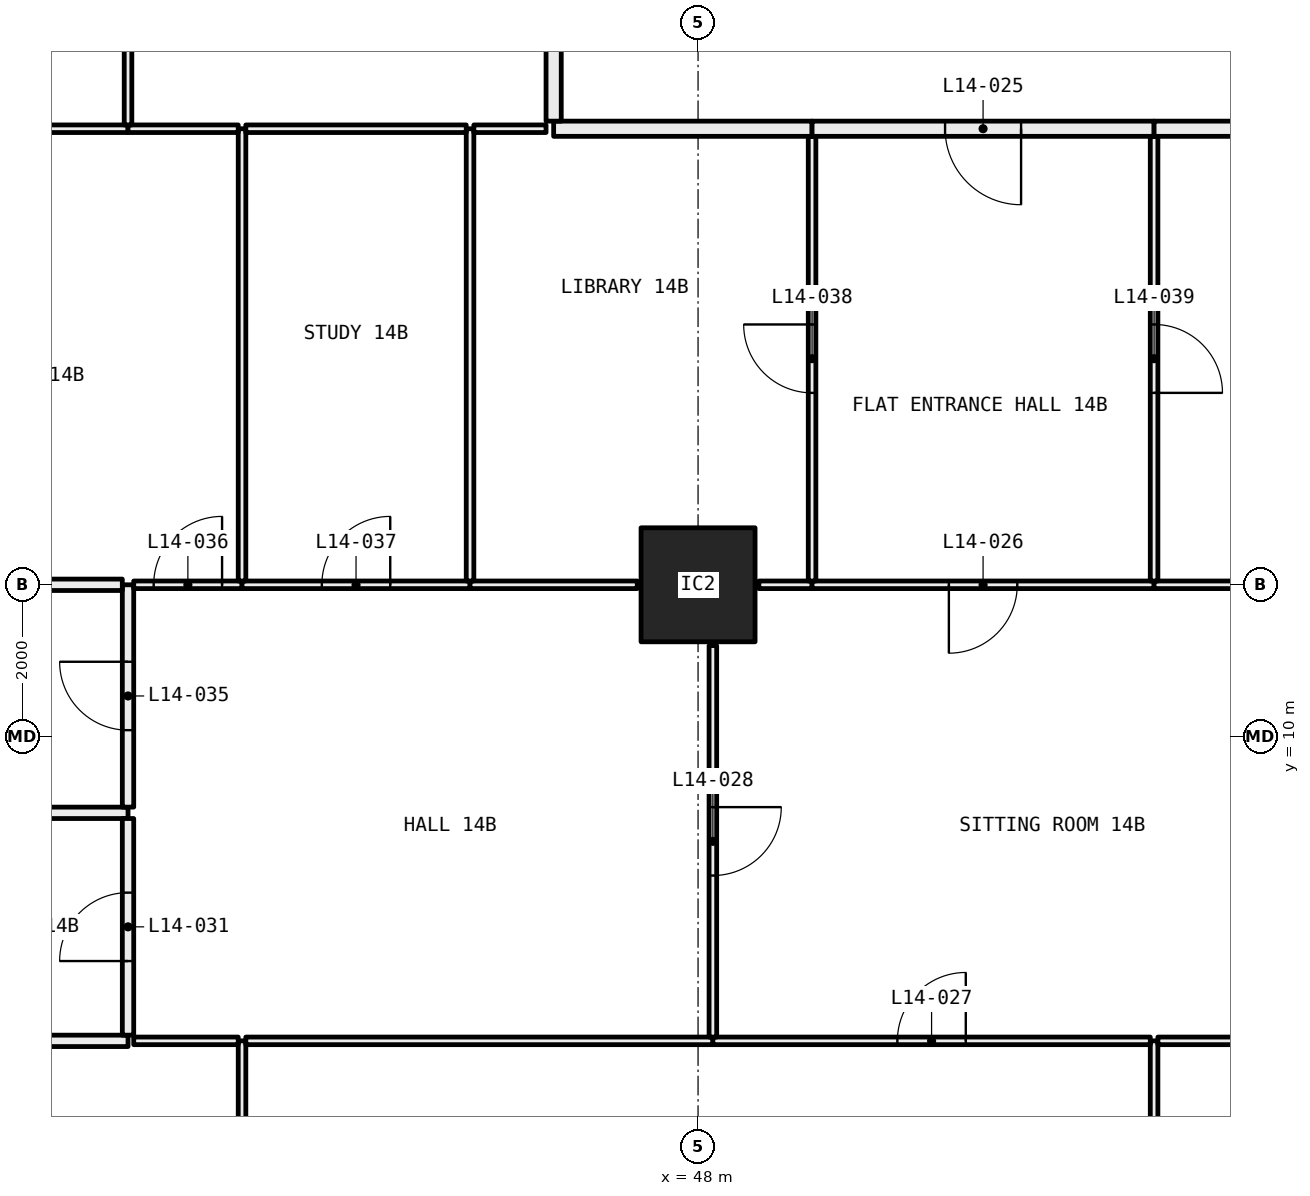
"""IFC4 building model, lengths in metres.
Left out: names, types, materials, properties, quantities, classifications, styles, units other than length and angle.
Written with IfcOpenShell. Run it as: python <this file> out.ifc"""

import sys

from ifc_helpers import new_model, si_unit, direction, frame, frame_2d, origin, origin_2d, place, context, subcontext, project, spatial, rectangle, hollow_rectangle, extrude, element, fill, save


model = new_model("IFC4")
c1 = context("Model", 3, precision=1e-05, world=origin(), true_north=direction((0.0, 1.0)))
c2 = subcontext(c1, "Body", "Model", "MODEL_VIEW")
j1 = project(units=[si_unit("LENGTHUNIT", "METRE"), si_unit("PLANEANGLEUNIT", "RADIAN")], contexts=[c1])
p1 = place(None, origin())
s1 = spatial("IfcSite", under=j1, at=p1, CompositionType="ELEMENT")
p2 = place(p1, origin())
s2 = spatial("IfcBuilding", under=s1, at=p2, CompositionType="ELEMENT")
p3 = place(p2, frame((0.0, 0.0, 61.05)))
s3 = spatial("IfcBuildingStorey", under=s2, at=p3, CompositionType="ELEMENT", Elevation=61.05)
p4 = place(p3, frame((48.0, 12.0, 0.0), z_axis=(0.0, 0.0, 1.0), x_axis=(1.0, 0.0, 0.0)))
e1 = element("IfcColumn", 1, at=p4, inside=s3, PredefinedType="COLUMN", context=c2, shape_type="SweptSolid", body=[
    extrude(hollow_rectangle(XDim=1.5, YDim=1.5, WallThickness=0.065, at=origin_2d()), origin(), (0.0, 0.0, 1.0), 3.05),
])
p5 = place(p3, frame((42.0, 0.72, 0.0), z_axis=(0.0, 0.0, 1.0), x_axis=(0.0, 1.0, 0.0)))
e2 = element("IfcWall", 2, at=p5, inside=s3, PredefinedType="PARTITIONING", context=c2, shape_type="SweptSolid", body=[
    extrude(rectangle(XDim=5.28, YDim=0.1, at=frame_2d((2.64, 0.0))), origin(), (0.0, 0.0, 1.0), 3.05),
])
p6 = place(p5, frame((2.19, 0.0, 0.0)))
e3 = element("IfcOpeningElement", 3, at=p6, cuts=e2, PredefinedType="OPENING", context=c2, shape_type="SweptSolid", body=[
    extrude(rectangle(XDim=0.9, YDim=2.1, at=frame_2d((0.45, 1.05))), frame((0.0, 0.06, 0.0), z_axis=(0.0, -1.0, 0.0), x_axis=(1.0, 0.0, 0.0)), (0.0, 0.0, 1.0), 0.12),
])
p7 = place(p3, frame((40.5, 6.0, 0.0), z_axis=(0.0, 0.0, 1.0), x_axis=(-1.0, 0.0, 0.0)))
e4 = element("IfcWall", 4, at=p7, inside=s3, PredefinedType="PARTITIONING", context=c2, shape_type="SweptSolid", body=[
    extrude(rectangle(XDim=4.4, YDim=0.15, at=frame_2d((2.2, 0.0))), origin(), (0.0, 0.0, 1.0), 3.05),
])
p8 = place(p3, frame((41.95, 6.0, 0.0), z_axis=(0.0, 0.0, 1.0), x_axis=(-1.0, 0.0, 0.0)))
e5 = element("IfcWall", 5, at=p8, inside=s3, PredefinedType="PARTITIONING", context=c2, shape_type="SweptSolid", body=[
    extrude(rectangle(XDim=1.375, YDim=0.1, at=frame_2d((0.688, 0.0))), origin(), (0.0, 0.0, 1.0), 3.05),
])
p9 = place(p3, frame((54.0, 0.72, 0.0), z_axis=(0.0, 0.0, 1.0), x_axis=(0.0, 1.0, 0.0)))
e6 = element("IfcWall", 6, at=p9, inside=s3, PredefinedType="PARTITIONING", context=c2, shape_type="SweptSolid", body=[
    extrude(rectangle(XDim=5.28, YDim=0.1, at=frame_2d((2.64, 0.0))), origin(), (0.0, 0.0, 1.0), 3.05),
])
p10 = place(p9, frame((2.19, 0.0, 0.0)))
e7 = element("IfcOpeningElement", 7, at=p10, cuts=e6, PredefinedType="OPENING", context=c2, shape_type="SweptSolid", body=[
    extrude(rectangle(XDim=0.9, YDim=2.1, at=frame_2d((0.45, 1.05))), frame((0.0, 0.06, 0.0), z_axis=(0.0, -1.0, 0.0), x_axis=(1.0, 0.0, 0.0)), (0.0, 0.0, 1.0), 0.12),
])
p11 = place(p3, frame((48.195, 6.0, 0.0), z_axis=(0.0, 0.0, 1.0), x_axis=(-1.0, 0.0, 0.0)))
e8 = element("IfcWall", 8, at=p11, inside=s3, PredefinedType="PARTITIONING", context=c2, shape_type="SweptSolid", body=[
    extrude(rectangle(XDim=6.145, YDim=0.1, at=frame_2d((3.073, 0.0))), origin(), (0.0, 0.0, 1.0), 2.45),
])
p12 = place(p3, frame((53.95, 6.0, 0.0), z_axis=(0.0, 0.0, 1.0), x_axis=(-1.0, 0.0, 0.0)))
e9 = element("IfcWall", 9, at=p12, inside=s3, PredefinedType="PARTITIONING", context=c2, shape_type="SweptSolid", body=[
    extrude(rectangle(XDim=5.755, YDim=0.1, at=frame_2d((2.877, 0.0))), origin(), (0.0, 0.0, 1.0), 3.05),
])
p13 = place(p12, frame((2.427, 0.0, 0.0)))
e10 = element("IfcOpeningElement", 10, at=p13, cuts=e9, PredefinedType="OPENING", context=c2, shape_type="SweptSolid", body=[
    extrude(rectangle(XDim=0.9, YDim=2.1, at=frame_2d((0.45, 1.05))), frame((0.0, 0.06, 0.0), z_axis=(0.0, -1.0, 0.0), x_axis=(1.0, 0.0, 0.0)), (0.0, 0.0, 1.0), 0.12),
])
p14 = place(p3, frame((55.89, 6.0, 0.0), z_axis=(0.0, 0.0, 1.0), x_axis=(-1.0, 0.0, 0.0)))
e11 = element("IfcWall", 11, at=p14, inside=s3, PredefinedType="PARTITIONING", context=c2, shape_type="SweptSolid", body=[
    extrude(rectangle(XDim=1.84, YDim=0.1, at=frame_2d((0.92, 0.0))), origin(), (0.0, 0.0, 1.0), 3.05),
])
p15 = place(p3, frame((40.5, 9.0, 0.0), z_axis=(0.0, 0.0, 1.0), x_axis=(-1.0, 0.0, 0.0)))
e12 = element("IfcWall", 12, at=p15, inside=s3, PredefinedType="PARTITIONING", context=c2, shape_type="SweptSolid", body=[
    extrude(rectangle(XDim=4.4, YDim=0.15, at=frame_2d((2.2, 0.0))), origin(), (0.0, 0.0, 1.0), 3.05),
])
p16 = place(p3, frame((40.5, 6.075, 0.0), z_axis=(0.0, 0.0, 1.0), x_axis=(0.0, 1.0, 0.0)))
e13 = element("IfcWall", 13, at=p16, inside=s3, PredefinedType="PARTITIONING", context=c2, shape_type="SweptSolid", body=[
    extrude(rectangle(XDim=2.85, YDim=0.15, at=frame_2d((1.425, 0.0))), origin(), (0.0, 0.0, 1.0), 3.05),
])
p17 = place(p16, frame((0.975, 0.0, 0.0)))
e14 = element("IfcOpeningElement", 14, at=p17, cuts=e13, PredefinedType="OPENING", context=c2, shape_type="SweptSolid", body=[
    extrude(rectangle(XDim=0.9, YDim=2.1, at=frame_2d((0.45, 1.05))), frame((0.0, 0.085, 0.0), z_axis=(0.0, -1.0, 0.0), x_axis=(1.0, 0.0, 0.0)), (0.0, 0.0, 1.0), 0.17),
])
p18 = place(p3, frame((40.5, 9.075, 0.0), z_axis=(0.0, 0.0, 1.0), x_axis=(0.0, 1.0, 0.0)))
e15 = element("IfcWall", 15, at=p18, inside=s3, PredefinedType="PARTITIONING", context=c2, shape_type="SweptSolid", body=[
    extrude(rectangle(XDim=2.925, YDim=0.15, at=frame_2d((1.462, 0.0))), origin(), (0.0, 0.0, 1.0), 2.45),
])
p19 = place(p18, frame((1.012, 0.0, 0.0)))
e16 = element("IfcOpeningElement", 16, at=p19, cuts=e15, PredefinedType="OPENING", context=c2, shape_type="SweptSolid", body=[
    extrude(rectangle(XDim=0.9, YDim=2.1, at=frame_2d((0.45, 1.05))), frame((0.0, 0.085, 0.0), z_axis=(0.0, -1.0, 0.0), x_axis=(1.0, 0.0, 0.0)), (0.0, 0.0, 1.0), 0.17),
])
p20 = place(p3, frame((40.425, 12.0, 0.0), z_axis=(0.0, 0.0, 1.0), x_axis=(-1.0, 0.0, 0.0)))
e17 = element("IfcWall", 17, at=p20, inside=s3, PredefinedType="PARTITIONING", context=c2, shape_type="SweptSolid", body=[
    extrude(rectangle(XDim=3.625, YDim=0.15, at=frame_2d((1.812, 0.0))), origin(), (0.0, 0.0, 1.0), 2.45),
])
p21 = place(p3, frame((48.195, 6.05, 0.0), z_axis=(0.0, 0.0, 1.0), x_axis=(0.0, 1.0, 0.0)))
e18 = element("IfcWall", 18, at=p21, inside=s3, PredefinedType="PARTITIONING", context=c2, shape_type="SweptSolid", body=[
    extrude(rectangle(XDim=5.15, YDim=0.1, at=frame_2d((2.575, 0.0))), origin(), (0.0, 0.0, 1.0), 3.05),
])
p22 = place(p21, frame((2.125, 0.0, 0.0)))
e19 = element("IfcOpeningElement", 19, at=p22, cuts=e18, PredefinedType="OPENING", context=c2, shape_type="SweptSolid", body=[
    extrude(rectangle(XDim=0.9, YDim=2.1, at=frame_2d((0.45, 1.05))), frame((0.0, 0.06, 0.0), z_axis=(0.0, -1.0, 0.0), x_axis=(1.0, 0.0, 0.0)), (0.0, 0.0, 1.0), 0.12),
])
p23 = place(p3, frame((42.0, 12.0, 0.0), z_axis=(0.0, 0.0, 1.0), x_axis=(-1.0, 0.0, 0.0)))
e20 = element("IfcWall", 20, at=p23, inside=s3, PredefinedType="PARTITIONING", context=c2, shape_type="SweptSolid", body=[
    extrude(rectangle(XDim=1.425, YDim=0.1, at=frame_2d((0.712, 0.0))), origin(), (0.0, 0.0, 1.0), 2.45),
])
p24 = place(p23, frame((0.262, 0.0, 0.0)))
e21 = element("IfcOpeningElement", 21, at=p24, cuts=e20, PredefinedType="OPENING", context=c2, shape_type="SweptSolid", body=[
    extrude(rectangle(XDim=0.9, YDim=2.1, at=frame_2d((0.45, 1.05))), frame((0.0, 0.06, 0.0), z_axis=(0.0, -1.0, 0.0), x_axis=(1.0, 0.0, 0.0)), (0.0, 0.0, 1.0), 0.12),
])
p25 = place(p3, frame((45.0, 12.0, 0.0), z_axis=(0.0, 0.0, 1.0), x_axis=(-1.0, 0.0, 0.0)))
e22 = element("IfcWall", 22, at=p25, inside=s3, PredefinedType="PARTITIONING", context=c2, shape_type="SweptSolid", body=[
    extrude(rectangle(XDim=3.0, YDim=0.1, at=frame_2d((1.5, 0.0))), origin(), (0.0, 0.0, 1.0), 2.45),
])
p26 = place(p25, frame((1.05, 0.0, 0.0)))
e23 = element("IfcOpeningElement", 23, at=p26, cuts=e22, PredefinedType="OPENING", context=c2, shape_type="SweptSolid", body=[
    extrude(rectangle(XDim=0.9, YDim=2.1, at=frame_2d((0.45, 1.05))), frame((0.0, 0.06, 0.0), z_axis=(0.0, -1.0, 0.0), x_axis=(1.0, 0.0, 0.0)), (0.0, 0.0, 1.0), 0.12),
])
p27 = place(p3, frame((47.2, 12.0, 0.0), z_axis=(0.0, 0.0, 1.0), x_axis=(-1.0, 0.0, 0.0)))
e24 = element("IfcWall", 24, at=p27, inside=s3, PredefinedType="PARTITIONING", context=c2, shape_type="SweptSolid", body=[
    extrude(rectangle(XDim=2.2, YDim=0.1, at=frame_2d((1.1, 0.0))), origin(), (0.0, 0.0, 1.0), 2.45),
])
p28 = place(p3, frame((49.5, 12.0, 0.0), z_axis=(0.0, 0.0, 1.0), x_axis=(-1.0, 0.0, 0.0)))
e25 = element("IfcWall", 25, at=p28, inside=s3, PredefinedType="PARTITIONING", context=c2, shape_type="SweptSolid", body=[
    extrude(rectangle(XDim=0.7, YDim=0.1, at=frame_2d((0.35, 0.0))), origin(), (0.0, 0.0, 1.0), 2.45),
])
p29 = place(p3, frame((54.0, 12.0, 0.0), z_axis=(0.0, 0.0, 1.0), x_axis=(-1.0, 0.0, 0.0)))
e26 = element("IfcWall", 26, at=p29, inside=s3, PredefinedType="PARTITIONING", context=c2, shape_type="SweptSolid", body=[
    extrude(rectangle(XDim=4.5, YDim=0.1, at=frame_2d((2.25, 0.0))), origin(), (0.0, 0.0, 1.0), 2.45),
])
p30 = place(p29, frame((1.8, 0.0, 0.0)))
e27 = element("IfcOpeningElement", 27, at=p30, cuts=e26, PredefinedType="OPENING", context=c2, shape_type="SweptSolid", body=[
    extrude(rectangle(XDim=0.9, YDim=2.1, at=frame_2d((0.45, 1.05))), frame((0.0, 0.06, 0.0), z_axis=(0.0, -1.0, 0.0), x_axis=(1.0, 0.0, 0.0)), (0.0, 0.0, 1.0), 0.12),
])
p31 = place(p3, frame((55.84, 12.0, 0.0), z_axis=(0.0, 0.0, 1.0), x_axis=(-1.0, 0.0, 0.0)))
e28 = element("IfcWall", 28, at=p31, inside=s3, PredefinedType="PARTITIONING", context=c2, shape_type="SweptSolid", body=[
    extrude(rectangle(XDim=1.84, YDim=0.1, at=frame_2d((0.92, 0.0))), origin(), (0.0, 0.0, 1.0), 2.45),
])
p32 = place(p3, frame((42.0, 12.05, 0.0), z_axis=(0.0, 0.0, 1.0), x_axis=(0.0, 1.0, 0.0)))
e29 = element("IfcWall", 29, at=p32, inside=s3, PredefinedType="PARTITIONING", context=c2, shape_type="SweptSolid", body=[
    extrude(rectangle(XDim=5.95, YDim=0.1, at=frame_2d((2.975, 0.0))), origin(), (0.0, 0.0, 1.0), 2.45),
])
p33 = place(p3, frame((40.5, 18.0, 0.0), z_axis=(0.0, 0.0, 1.0), x_axis=(-1.0, 0.0, 0.0)))
e30 = element("IfcWall", 30, at=p33, inside=s3, PredefinedType="PARTITIONING", context=c2, shape_type="SweptSolid", body=[
    extrude(rectangle(XDim=4.4, YDim=0.1, at=frame_2d((2.2, 0.0))), origin(), (0.0, 0.0, 1.0), 3.05),
])
p34 = place(p33, frame((1.75, 0.0, 0.0)))
e31 = element("IfcOpeningElement", 31, at=p34, cuts=e30, PredefinedType="OPENING", context=c2, shape_type="SweptSolid", body=[
    extrude(rectangle(XDim=0.9, YDim=2.1, at=frame_2d((0.45, 1.05))), frame((0.0, 0.06, 0.0), z_axis=(0.0, -1.0, 0.0), x_axis=(1.0, 0.0, 0.0)), (0.0, 0.0, 1.0), 0.12),
])
p35 = place(p3, frame((41.95, 18.0, 0.0), z_axis=(0.0, 0.0, 1.0), x_axis=(-1.0, 0.0, 0.0)))
e32 = element("IfcWall", 32, at=p35, inside=s3, PredefinedType="PARTITIONING", context=c2, shape_type="SweptSolid", body=[
    extrude(rectangle(XDim=1.45, YDim=0.1, at=frame_2d((0.725, 0.0))), origin(), (0.0, 0.0, 1.0), 3.05),
])
p36 = place(p3, frame((45.0, 12.05, 0.0), z_axis=(0.0, 0.0, 1.0), x_axis=(0.0, 1.0, 0.0)))
e33 = element("IfcWall", 33, at=p36, inside=s3, PredefinedType="PARTITIONING", context=c2, shape_type="SweptSolid", body=[
    extrude(rectangle(XDim=5.95, YDim=0.1, at=frame_2d((2.975, 0.0))), origin(), (0.0, 0.0, 1.0), 2.45),
])
p37 = place(p3, frame((44.95, 18.0, 0.0), z_axis=(0.0, 0.0, 1.0), x_axis=(-1.0, 0.0, 0.0)))
e34 = element("IfcWall", 34, at=p37, inside=s3, PredefinedType="PARTITIONING", context=c2, shape_type="SweptSolid", body=[
    extrude(rectangle(XDim=2.9, YDim=0.1, at=frame_2d((1.45, 0.0))), origin(), (0.0, 0.0, 1.0), 3.05),
])
p38 = place(p3, frame((49.5, 12.05, 0.0), z_axis=(0.0, 0.0, 1.0), x_axis=(0.0, 1.0, 0.0)))
e35 = element("IfcWall", 35, at=p38, inside=s3, PredefinedType="PARTITIONING", context=c2, shape_type="SweptSolid", body=[
    extrude(rectangle(XDim=5.85, YDim=0.1, at=frame_2d((2.925, 0.0))), origin(), (0.0, 0.0, 1.0), 2.45),
])
p39 = place(p38, frame((2.475, 0.0, 0.0)))
e36 = element("IfcOpeningElement", 36, at=p39, cuts=e35, PredefinedType="OPENING", context=c2, shape_type="SweptSolid", body=[
    extrude(rectangle(XDim=0.9, YDim=2.1, at=frame_2d((0.45, 1.05))), frame((0.0, 0.06, 0.0), z_axis=(0.0, -1.0, 0.0), x_axis=(1.0, 0.0, 0.0)), (0.0, 0.0, 1.0), 0.12),
])
p40 = place(p3, frame((46.0, 18.0, 0.0), z_axis=(0.0, 0.0, 1.0), x_axis=(-1.0, 0.0, 0.0)))
e37 = element("IfcWall", 37, at=p40, inside=s3, PredefinedType="PARTITIONING", context=c2, shape_type="SweptSolid", body=[
    extrude(rectangle(XDim=0.95, YDim=0.1, at=frame_2d((0.475, 0.0))), origin(), (0.0, 0.0, 1.0), 3.05),
])
p41 = place(p3, frame((49.5, 18.0, 0.0), z_axis=(0.0, 0.0, 1.0), x_axis=(-1.0, 0.0, 0.0)))
e38 = element("IfcWall", 38, at=p41, inside=s3, PredefinedType="PARTITIONING", context=c2, shape_type="SweptSolid", body=[
    extrude(rectangle(XDim=3.4, YDim=0.2, at=frame_2d((1.7, 0.0))), origin(), (0.0, 0.0, 1.0), 3.05),
])
p42 = place(p3, frame((54.0, 12.05, 0.0), z_axis=(0.0, 0.0, 1.0), x_axis=(0.0, 1.0, 0.0)))
e39 = element("IfcWall", 39, at=p42, inside=s3, PredefinedType="PARTITIONING", context=c2, shape_type="SweptSolid", body=[
    extrude(rectangle(XDim=5.85, YDim=0.1, at=frame_2d((2.925, 0.0))), origin(), (0.0, 0.0, 1.0), 2.45),
])
p43 = place(p42, frame((2.475, 0.0, 0.0)))
e40 = element("IfcOpeningElement", 40, at=p43, cuts=e39, PredefinedType="OPENING", context=c2, shape_type="SweptSolid", body=[
    extrude(rectangle(XDim=0.9, YDim=2.1, at=frame_2d((0.45, 1.05))), frame((0.0, 0.06, 0.0), z_axis=(0.0, -1.0, 0.0), x_axis=(1.0, 0.0, 0.0)), (0.0, 0.0, 1.0), 0.12),
])
p44 = place(p3, frame((54.0, 18.0, 0.0), z_axis=(0.0, 0.0, 1.0), x_axis=(-1.0, 0.0, 0.0)))
e41 = element("IfcWall", 41, at=p44, inside=s3, PredefinedType="PARTITIONING", context=c2, shape_type="SweptSolid", body=[
    extrude(rectangle(XDim=4.5, YDim=0.2, at=frame_2d((2.25, 0.0))), origin(), (0.0, 0.0, 1.0), 3.05),
])
p45 = place(p44, frame((1.75, 0.0, 0.0)))
e42 = element("IfcOpeningElement", 42, at=p45, cuts=e41, PredefinedType="OPENING", context=c2, shape_type="SweptSolid", body=[
    extrude(rectangle(XDim=1.0, YDim=2.1, at=frame_2d((0.5, 1.05))), frame((0.0, 0.11, 0.0), z_axis=(0.0, -1.0, 0.0), x_axis=(1.0, 0.0, 0.0)), (0.0, 0.0, 1.0), 0.22),
])
p46 = place(p3, frame((61.9, 18.0, 0.0), z_axis=(0.0, 0.0, 1.0), x_axis=(-1.0, 0.0, 0.0)))
e43 = element("IfcWall", 43, at=p46, inside=s3, PredefinedType="PARTITIONING", context=c2, shape_type="SweptSolid", body=[
    extrude(rectangle(XDim=7.9, YDim=0.2, at=frame_2d((3.95, 0.0))), origin(), (0.0, 0.0, 1.0), 3.05),
])
p47 = place(p3, frame((40.5, 18.05, 0.0), z_axis=(0.0, 0.0, 1.0), x_axis=(0.0, 1.0, 0.0)))
e44 = element("IfcWall", 44, at=p47, inside=s3, PredefinedType="PARTITIONING", context=c2, shape_type="SweptSolid", body=[
    extrude(rectangle(XDim=6.175, YDim=0.1, at=frame_2d((3.087, 0.0))), origin(), (0.0, 0.0, 1.0), 2.45),
])
p48 = place(p47, frame((2.637, 0.0, 0.0)))
e45 = element("IfcOpeningElement", 45, at=p48, cuts=e44, PredefinedType="OPENING", context=c2, shape_type="SweptSolid", body=[
    extrude(rectangle(XDim=0.9, YDim=2.1, at=frame_2d((0.45, 1.05))), frame((0.0, 0.06, 0.0), z_axis=(0.0, -1.0, 0.0), x_axis=(1.0, 0.0, 0.0)), (0.0, 0.0, 1.0), 0.12),
])
p49 = place(p3, frame((46.1, 18.1, 0.0), z_axis=(0.0, 0.0, 1.0), x_axis=(0.0, 1.0, 0.0)))
e46 = element("IfcWall", 46, at=p49, inside=s3, PredefinedType="PARTITIONING", context=c2, shape_type="SweptSolid", body=[
    extrude(rectangle(XDim=6.2, YDim=0.2, at=frame_2d((3.1, 0.0))), origin(), (0.0, 0.0, 1.0), 2.45),
])
p50 = place(p45, origin())
e47 = element("IfcDoor", 47, at=p50, inside=s3, OperationType="SINGLE_SWING_RIGHT", PredefinedType="DOOR", context=c2, shape_type="SweptSolid", body=[
    extrude(rectangle(XDim=1.0, YDim=2.1, at=frame_2d((0.5, 1.05))), frame((0.0, 0.025, 0.0), z_axis=(0.0, -1.0, 0.0), x_axis=(1.0, 0.0, 0.0)), (0.0, 0.0, 1.0), 0.05),
])
fill(e42, e47)
p51 = place(p30, origin())
e48 = element("IfcDoor", 48, at=p51, inside=s3, OperationType="SINGLE_SWING_LEFT", PredefinedType="DOOR", context=c2, shape_type="SweptSolid", body=[
    extrude(rectangle(XDim=0.9, YDim=2.1, at=frame_2d((0.45, 1.05))), frame((0.0, 0.025, 0.0), z_axis=(0.0, -1.0, 0.0), x_axis=(1.0, 0.0, 0.0)), (0.0, 0.0, 1.0), 0.05),
])
fill(e27, e48)
p52 = place(p13, frame((0.9, 0.0, 0.0), x_axis=(-1.0, 0.0, 0.0)))
e49 = element("IfcDoor", 49, at=p52, inside=s3, OperationType="SINGLE_SWING_LEFT", PredefinedType="DOOR", context=c2, shape_type="SweptSolid", body=[
    extrude(rectangle(XDim=0.9, YDim=2.1, at=frame_2d((0.45, 1.05))), frame((0.0, 0.025, 0.0), z_axis=(0.0, -1.0, 0.0), x_axis=(1.0, 0.0, 0.0)), (0.0, 0.0, 1.0), 0.05),
])
fill(e10, e49)
p53 = place(p22, frame((0.9, 0.0, 0.0), x_axis=(-1.0, 0.0, 0.0)))
e50 = element("IfcDoor", 50, at=p53, inside=s3, OperationType="SINGLE_SWING_RIGHT", PredefinedType="DOOR", context=c2, shape_type="SweptSolid", body=[
    extrude(rectangle(XDim=0.9, YDim=2.1, at=frame_2d((0.45, 1.05))), frame((0.0, 0.025, 0.0), z_axis=(0.0, -1.0, 0.0), x_axis=(1.0, 0.0, 0.0)), (0.0, 0.0, 1.0), 0.05),
])
fill(e19, e50)
p54 = place(p17, origin())
e51 = element("IfcDoor", 51, at=p54, inside=s3, OperationType="SINGLE_SWING_RIGHT", PredefinedType="DOOR", context=c2, shape_type="SweptSolid", body=[
    extrude(rectangle(XDim=0.9, YDim=2.1, at=frame_2d((0.45, 1.05))), frame((0.0, 0.025, 0.0), z_axis=(0.0, -1.0, 0.0), x_axis=(1.0, 0.0, 0.0)), (0.0, 0.0, 1.0), 0.05),
])
fill(e14, e51)
p55 = place(p19, origin())
e52 = element("IfcDoor", 52, at=p55, inside=s3, OperationType="SINGLE_SWING_LEFT", PredefinedType="DOOR", context=c2, shape_type="SweptSolid", body=[
    extrude(rectangle(XDim=0.9, YDim=2.1, at=frame_2d((0.45, 1.05))), frame((0.0, 0.025, 0.0), z_axis=(0.0, -1.0, 0.0), x_axis=(1.0, 0.0, 0.0)), (0.0, 0.0, 1.0), 0.05),
])
fill(e16, e52)
p56 = place(p24, frame((0.9, 0.0, 0.0), x_axis=(-1.0, 0.0, 0.0)))
e53 = element("IfcDoor", 53, at=p56, inside=s3, OperationType="SINGLE_SWING_LEFT", PredefinedType="DOOR", context=c2, shape_type="SweptSolid", body=[
    extrude(rectangle(XDim=0.9, YDim=2.1, at=frame_2d((0.45, 1.05))), frame((0.0, 0.025, 0.0), z_axis=(0.0, -1.0, 0.0), x_axis=(1.0, 0.0, 0.0)), (0.0, 0.0, 1.0), 0.05),
])
fill(e21, e53)
p57 = place(p26, frame((0.9, 0.0, 0.0), x_axis=(-1.0, 0.0, 0.0)))
e54 = element("IfcDoor", 54, at=p57, inside=s3, OperationType="SINGLE_SWING_LEFT", PredefinedType="DOOR", context=c2, shape_type="SweptSolid", body=[
    extrude(rectangle(XDim=0.9, YDim=2.1, at=frame_2d((0.45, 1.05))), frame((0.0, 0.025, 0.0), z_axis=(0.0, -1.0, 0.0), x_axis=(1.0, 0.0, 0.0)), (0.0, 0.0, 1.0), 0.05),
])
fill(e23, e54)
p58 = place(p39, origin())
e55 = element("IfcDoor", 55, at=p58, inside=s3, OperationType="SINGLE_SWING_LEFT", PredefinedType="DOOR", context=c2, shape_type="SweptSolid", body=[
    extrude(rectangle(XDim=0.9, YDim=2.1, at=frame_2d((0.45, 1.05))), frame((0.0, 0.025, 0.0), z_axis=(0.0, -1.0, 0.0), x_axis=(1.0, 0.0, 0.0)), (0.0, 0.0, 1.0), 0.05),
])
fill(e36, e55)
p59 = place(p43, frame((0.9, 0.0, 0.0), x_axis=(-1.0, 0.0, 0.0)))
e56 = element("IfcDoor", 56, at=p59, inside=s3, OperationType="SINGLE_SWING_LEFT", PredefinedType="DOOR", context=c2, shape_type="SweptSolid", body=[
    extrude(rectangle(XDim=0.9, YDim=2.1, at=frame_2d((0.45, 1.05))), frame((0.0, 0.025, 0.0), z_axis=(0.0, -1.0, 0.0), x_axis=(1.0, 0.0, 0.0)), (0.0, 0.0, 1.0), 0.05),
])
fill(e40, e56)
save(model, sys.argv[1])
